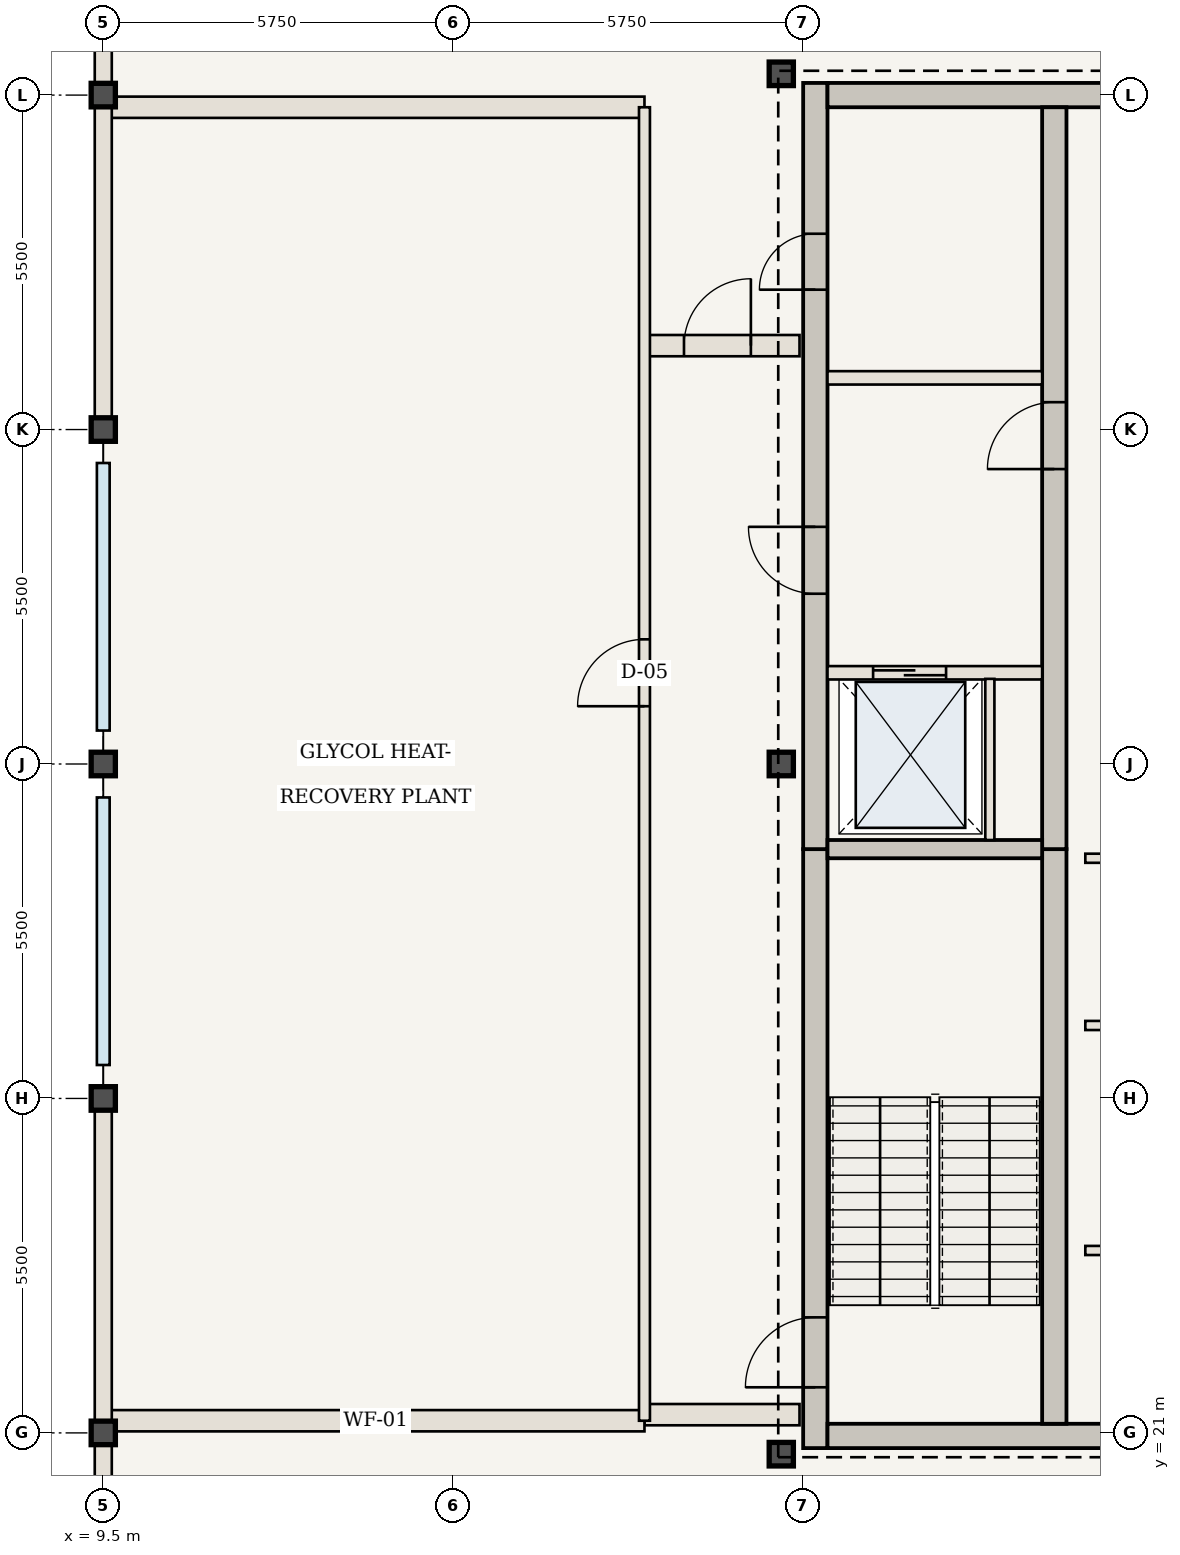
"""IFC4 building model, lengths in metres.
Left out: names, types, materials, properties, quantities, classifications, styles, units other than length and angle.
Written with IfcOpenShell. Run it as: python <this file> out.ifc"""

import sys

from ifc_helpers import new_model, si_unit, direction, frame, frame_2d, origin, origin_2d, place, context, subcontext, project, spatial, rectangle, i_section, extrude, element, fill, save


model = new_model("IFC4")
c1 = context("Model", 3, precision=1e-05, world=origin(), true_north=direction((0.0, 1.0)))
c2 = subcontext(c1, "Body", "Model", "MODEL_VIEW")
j1 = project(units=[si_unit("LENGTHUNIT", "METRE"), si_unit("PLANEANGLEUNIT", "RADIAN")], contexts=[c1])
p1 = place(None, origin())
s1 = spatial("IfcSite", under=j1, at=p1, CompositionType="ELEMENT")
p2 = place(p1, origin())
s2 = spatial("IfcBuilding", under=s1, at=p2, CompositionType="ELEMENT")
p3 = place(p2, frame((0.0, 0.0, 326.9)))
s3 = spatial("IfcBuildingStorey", under=s2, at=p3, CompositionType="ELEMENT", Elevation=326.9)
p4 = place(p3, frame((21.21, 20.75, 0.0), z_axis=(0.0, 0.0, 1.0), x_axis=(0.0, 1.0, 0.0)))
e1 = element("IfcWall", 1, at=p4, inside=s3, PredefinedType="SHEAR", context=c2, shape_type="SweptSolid", body=[
    extrude(rectangle(XDim=9.85, YDim=0.4, at=frame_2d((4.925, 0.0))), origin(), (0.0, 0.0, 1.0), 4.55),
])
p5 = place(p4, frame((1.0, 0.0, 0.0)))
e2 = element("IfcOpeningElement", 2, at=p5, cuts=e1, PredefinedType="OPENING", context=c2, shape_type="SweptSolid", body=[
    extrude(rectangle(XDim=1.15, YDim=2.15, at=frame_2d((0.575, 1.075))), frame((0.0, 0.21, 0.0), z_axis=(0.0, -1.0, 0.0), x_axis=(1.0, 0.0, 0.0)), (0.0, 0.0, 1.0), 0.42),
])
p6 = place(p3, frame((21.21, 30.6, 0.0), z_axis=(0.0, 0.0, 1.0), x_axis=(0.0, 1.0, 0.0)))
e3 = element("IfcWall", 3, at=p6, inside=s3, PredefinedType="SHEAR", context=c2, shape_type="SweptSolid", body=[
    extrude(rectangle(XDim=12.6, YDim=0.4, at=frame_2d((6.3, 0.0))), origin(), (0.0, 0.0, 1.0), 4.55),
])
p7 = place(p6, frame((4.2, 0.0, 0.0)))
e4 = element("IfcOpeningElement", 4, at=p7, cuts=e3, PredefinedType="OPENING", context=c2, shape_type="SweptSolid", body=[
    extrude(rectangle(XDim=1.1, YDim=2.15, at=frame_2d((0.55, 1.075))), frame((0.0, 0.21, 0.0), z_axis=(0.0, -1.0, 0.0), x_axis=(1.0, 0.0, 0.0)), (0.0, 0.0, 1.0), 0.42),
])
p8 = place(p6, frame((9.2, 0.0, 0.0)))
e5 = element("IfcOpeningElement", 5, at=p8, cuts=e3, PredefinedType="OPENING", context=c2, shape_type="SweptSolid", body=[
    extrude(rectangle(XDim=0.92, YDim=2.1, at=frame_2d((0.46, 1.05))), frame((0.0, 0.21, 0.0), z_axis=(0.0, -1.0, 0.0), x_axis=(1.0, 0.0, 0.0)), (0.0, 0.0, 1.0), 0.42),
])
p9 = place(p3, frame((21.41, 20.95, 0.0), z_axis=(0.0, 0.0, 1.0), x_axis=(1.0, 0.0, 0.0)))
e6 = element("IfcWall", 6, at=p9, inside=s3, PredefinedType="SHEAR", context=c2, shape_type="SweptSolid", body=[
    extrude(rectangle(XDim=13.74, YDim=0.4, at=frame_2d((6.87, 0.0))), origin(), (0.0, 0.0, 1.0), 4.55),
])
p10 = place(p3, frame((21.41, 43.0, 0.0), z_axis=(0.0, 0.0, 1.0), x_axis=(1.0, 0.0, 0.0)))
e7 = element("IfcWall", 7, at=p10, inside=s3, PredefinedType="SHEAR", context=c2, shape_type="SweptSolid", body=[
    extrude(rectangle(XDim=12.79, YDim=0.4, at=frame_2d((6.395, 0.0))), origin(), (0.0, 0.0, 1.0), 4.55),
])
p11 = place(p3, frame((25.14, 21.15, 0.0), z_axis=(0.0, 0.0, 1.0), x_axis=(0.0, 1.0, 0.0)))
e8 = element("IfcWall", 8, at=p11, inside=s3, PredefinedType="SHEAR", context=c2, shape_type="SweptSolid", body=[
    extrude(rectangle(XDim=9.45, YDim=0.4, at=frame_2d((4.725, 0.0))), origin(), (0.0, 0.0, 1.0), 4.55),
])
p12 = place(p3, frame((25.14, 30.6, 0.0), z_axis=(0.0, 0.0, 1.0), x_axis=(0.0, 1.0, 0.0)))
e9 = element("IfcWall", 9, at=p12, inside=s3, PredefinedType="SHEAR", context=c2, shape_type="SweptSolid", body=[
    extrude(rectangle(XDim=12.2, YDim=0.4, at=frame_2d((6.1, 0.0))), origin(), (0.0, 0.0, 1.0), 4.55),
])
p13 = place(p12, frame((6.25, 0.0, 0.0)))
e10 = element("IfcOpeningElement", 10, at=p13, cuts=e9, PredefinedType="OPENING", context=c2, shape_type="SweptSolid", body=[
    extrude(rectangle(XDim=1.1, YDim=2.15, at=frame_2d((0.55, 1.075))), frame((0.0, 0.21, 0.0), z_axis=(0.0, -1.0, 0.0), x_axis=(1.0, 0.0, 0.0)), (0.0, 0.0, 1.0), 0.42),
])
for number, where, z_axis, x_axis in (
    (11, (20.65, 20.65, 0.0), (0.0, 0.0, 1.0), (1.0, 0.0, 0.0)),
    (12, (20.65, 43.35, 0.0), (0.0, 0.0, 1.0), (1.0, 0.0, 0.0)),
    (13, (20.65, 32.0, 0.0), (0.0, 0.0, 1.0), (1.0, 0.0, 0.0)),
    (14, (9.5, 21.0, 0.0), (0.0, 0.0, 1.0), (1.0, 0.0, 0.0)),
    (15, (9.5, 26.5, 0.0), (0.0, 0.0, 1.0), (1.0, 0.0, 0.0)),
    (16, (9.5, 32.0, 0.0), (0.0, 0.0, 1.0), (1.0, 0.0, 0.0)),
    (17, (9.5, 37.5, 0.0), (0.0, 0.0, 1.0), (1.0, 0.0, 0.0)),
    (18, (9.5, 43.0, 0.0), (0.0, 0.0, 1.0), (1.0, 0.0, 0.0)),
):
    element("IfcColumn", number, at=place(p3, frame(where, z_axis=z_axis, x_axis=x_axis)), inside=s3, PredefinedType="COLUMN", context=c2, shape_type="SweptSolid", body=[
        extrude(i_section(OverallWidth=0.398, OverallDepth=0.387, WebThickness=0.021, FlangeThickness=0.033, at=origin_2d()), origin(), (0.0, 0.0, 1.0), 4.55),
    ])
p14 = place(p3, frame((21.41, 30.6, 0.0), z_axis=(0.0, 0.0, 1.0), x_axis=(1.0, 0.0, 0.0)))
e19 = element("IfcWall", 19, at=p14, inside=s3, PredefinedType="SHEAR", context=c2, shape_type="SweptSolid", body=[
    extrude(rectangle(XDim=3.53, YDim=0.3, at=frame_2d((1.765, 0.0))), origin(), (0.0, 0.0, 1.0), 4.29),
])
p15 = place(p3, frame((21.41, 33.5, 0.0), z_axis=(0.0, 0.0, 1.0), x_axis=(1.0, 0.0, 0.0)))
e20 = element("IfcWall", 20, at=p15, inside=s3, PredefinedType="STANDARD", context=c2, shape_type="SweptSolid", body=[
    extrude(rectangle(XDim=3.53, YDim=0.22, at=frame_2d((1.765, 0.0))), origin(), (0.0, 0.0, 1.0), 4.29),
])
p16 = place(p15, frame((0.75, 0.0, 0.0)))
e21 = element("IfcOpeningElement", 21, at=p16, cuts=e20, PredefinedType="OPENING", context=c2, shape_type="SweptSolid", body=[
    extrude(rectangle(XDim=1.2, YDim=2.2, at=frame_2d((0.6, 1.1))), frame((0.0, 0.12, 0.0), z_axis=(0.0, -1.0, 0.0), x_axis=(1.0, 0.0, 0.0)), (0.0, 0.0, 1.0), 0.24),
])
p17 = place(p3, frame((24.08, 30.75, 0.0), z_axis=(0.0, 0.0, 1.0), x_axis=(0.0, 1.0, 0.0)))
e22 = element("IfcWall", 22, at=p17, inside=s3, PredefinedType="STANDARD", context=c2, shape_type="SweptSolid", body=[
    extrude(rectangle(XDim=2.65, YDim=0.15, at=frame_2d((1.325, 0.0))), origin(), (0.0, 0.0, 1.0), 4.29),
])
p18 = place(p3, frame((21.41, 38.35, 0.0), z_axis=(0.0, 0.0, 1.0), x_axis=(1.0, 0.0, 0.0)))
e23 = element("IfcWall", 23, at=p18, inside=s3, PredefinedType="STANDARD", context=c2, shape_type="SweptSolid", body=[
    extrude(rectangle(XDim=3.53, YDim=0.22, at=frame_2d((1.765, 0.0))), origin(), (0.0, 0.0, 1.0), 4.29),
])
p19 = place(p3, frame((25.65, 24.0, 0.0), z_axis=(0.0, 0.0, 1.0), x_axis=(1.0, 0.0, 0.0)))
e24 = element("IfcWall", 24, at=p19, inside=s3, PredefinedType="STANDARD", context=c2, shape_type="SweptSolid", body=[
    extrude(rectangle(XDim=9.35, YDim=0.15, at=frame_2d((4.675, 0.0))), origin(), (0.0, 0.0, 1.0), 4.29),
])
p20 = place(p19, frame((1.35, 0.0, 0.0)))
e25 = element("IfcOpeningElement", 25, at=p20, cuts=e24, PredefinedType="OPENING", context=c2, shape_type="SweptSolid", body=[
    extrude(rectangle(XDim=0.95, YDim=2.15, at=frame_2d((0.475, 1.075))), frame((0.0, 0.085, 0.0), z_axis=(0.0, -1.0, 0.0), x_axis=(1.0, 0.0, 0.0)), (0.0, 0.0, 1.0), 0.17),
])
p21 = place(p19, frame((5.8, 0.0, 0.0)))
e26 = element("IfcOpeningElement", 26, at=p21, cuts=e24, PredefinedType="OPENING", context=c2, shape_type="SweptSolid", body=[
    extrude(rectangle(XDim=0.98, YDim=2.2, at=frame_2d((0.49, 1.1))), frame((0.0, 0.085, 0.0), z_axis=(0.0, -1.0, 0.0), x_axis=(1.0, 0.0, 0.0)), (0.0, 0.0, 1.0), 0.17),
])
p22 = place(p3, frame((25.65, 27.7, 0.0), z_axis=(0.0, 0.0, 1.0), x_axis=(1.0, 0.0, 0.0)))
e27 = element("IfcWall", 27, at=p22, inside=s3, PredefinedType="STANDARD", context=c2, shape_type="SweptSolid", body=[
    extrude(rectangle(XDim=9.35, YDim=0.15, at=frame_2d((4.675, 0.0))), origin(), (0.0, 0.0, 1.0), 4.29),
])
p23 = place(p22, frame((1.35, 0.0, 0.0)))
e28 = element("IfcOpeningElement", 28, at=p23, cuts=e27, PredefinedType="OPENING", context=c2, shape_type="SweptSolid", body=[
    extrude(rectangle(XDim=0.95, YDim=2.15, at=frame_2d((0.475, 1.075))), frame((0.0, 0.085, 0.0), z_axis=(0.0, -1.0, 0.0), x_axis=(1.0, 0.0, 0.0)), (0.0, 0.0, 1.0), 0.17),
])
p24 = place(p22, frame((6.4, 0.0, 0.0)))
e29 = element("IfcOpeningElement", 29, at=p24, cuts=e27, PredefinedType="OPENING", context=c2, shape_type="SweptSolid", body=[
    extrude(rectangle(XDim=0.98, YDim=2.2, at=frame_2d((0.49, 1.1))), frame((0.0, 0.085, 0.0), z_axis=(0.0, -1.0, 0.0), x_axis=(1.0, 0.0, 0.0)), (0.0, 0.0, 1.0), 0.17),
])
p25 = place(p3, frame((25.65, 30.45, 0.0), z_axis=(0.0, 0.0, 1.0), x_axis=(1.0, 0.0, 0.0)))
e30 = element("IfcWall", 30, at=p25, inside=s3, PredefinedType="STANDARD", context=c2, shape_type="SweptSolid", body=[
    extrude(rectangle(XDim=9.35, YDim=0.15, at=frame_2d((4.675, 0.0))), origin(), (0.0, 0.0, 1.0), 4.29),
])
p26 = place(p3, frame((18.4, 21.3, 0.0), z_axis=(0.0, 0.0, 1.0), x_axis=(1.0, 0.0, 0.0)))
e31 = element("IfcWall", 31, at=p26, inside=s3, PredefinedType="STANDARD", context=c2, shape_type="SweptSolid", body=[
    extrude(rectangle(XDim=2.55, YDim=0.35, at=frame_2d((1.275, 0.0))), origin(), (0.0, 0.0, 1.0), 4.29),
])
p27 = place(p3, frame((18.4, 38.88, 0.0), z_axis=(0.0, 0.0, 1.0), x_axis=(1.0, 0.0, 0.0)))
e32 = element("IfcWall", 32, at=p27, inside=s3, PredefinedType="STANDARD", context=c2, shape_type="SweptSolid", body=[
    extrude(rectangle(XDim=2.55, YDim=0.35, at=frame_2d((1.275, 0.0))), origin(), (0.0, 0.0, 1.0), 4.29),
])
p28 = place(p27, frame((0.65, 0.0, 0.0)))
e33 = element("IfcOpeningElement", 33, at=p28, cuts=e32, PredefinedType="OPENING", context=c2, shape_type="SweptSolid", body=[
    extrude(rectangle(XDim=1.1, YDim=2.15, at=frame_2d((0.55, 1.075))), frame((0.0, 0.185, 0.0), z_axis=(0.0, -1.0, 0.0), x_axis=(1.0, 0.0, 0.0)), (0.0, 0.0, 1.0), 0.37),
])
for number, where, z_axis, x_axis in (
    (34, (9.56, 21.2, 0.0), (0.0, 0.0, 1.0), (1.0, 0.0, 0.0)),
    (35, (9.56, 42.8, 0.0), (0.0, 0.0, 1.0), (1.0, 0.0, 0.0)),
):
    element("IfcWall", number, at=place(p3, frame(where, z_axis=z_axis, x_axis=x_axis)), inside=s3, PredefinedType="STANDARD", context=c2, shape_type="SweptSolid", body=[
        extrude(rectangle(XDim=8.84, YDim=0.35, at=frame_2d((4.42, 0.0))), origin(), (0.0, 0.0, 1.0), 4.29),
    ])
p29 = place(p3, frame((18.4, 21.2, 0.0), z_axis=(0.0, 0.0, 1.0), x_axis=(0.0, 1.0, 0.0)))
e36 = element("IfcWall", 36, at=p29, inside=s3, PredefinedType="STANDARD", context=c2, shape_type="SweptSolid", body=[
    extrude(rectangle(XDim=21.6, YDim=0.18, at=frame_2d((10.8, 0.0))), origin(), (0.0, 0.0, 1.0), 4.29),
])
p30 = place(p29, frame((11.75, 0.0, 0.0)))
e37 = element("IfcOpeningElement", 37, at=p30, cuts=e36, PredefinedType="OPENING", context=c2, shape_type="SweptSolid", body=[
    extrude(rectangle(XDim=1.1, YDim=2.15, at=frame_2d((0.55, 1.075))), frame((0.0, 0.1, 0.0), z_axis=(0.0, -1.0, 0.0), x_axis=(1.0, 0.0, 0.0)), (0.0, 0.0, 1.0), 0.2),
])
for number, where, z_axis, x_axis in (
    (38, (9.5, 15.5, 0.0), (0.0, 0.0, 1.0), (0.0, 1.0, 0.0)),
    (39, (9.5, 21.0, 0.0), (0.0, 0.0, 1.0), (0.0, 1.0, 0.0)),
    (40, (9.5, 37.5, 0.0), (0.0, 0.0, 1.0), (0.0, 1.0, 0.0)),
    (41, (9.5, 43.0, 0.0), (0.0, 0.0, 1.0), (0.0, 1.0, 0.0)),
):
    element("IfcWall", number, at=place(p3, frame(where, z_axis=z_axis, x_axis=x_axis)), inside=s3, PredefinedType="USERDEFINED", context=c2, shape_type="SweptSolid", body=[
        extrude(rectangle(XDim=5.5, YDim=0.28, at=frame_2d((2.75, 0.0))), origin(), (0.0, 0.0, 1.0), 3.57),
    ])
p31 = place(p5, origin())
e42 = element("IfcDoor", 42, at=p31, inside=s3, OperationType="SINGLE_SWING_LEFT", PredefinedType="DOOR", context=c2, shape_type="SweptSolid", body=[
    extrude(rectangle(XDim=1.15, YDim=2.15, at=frame_2d((0.575, 1.075))), frame((0.0, 0.025, 0.0), z_axis=(0.0, -1.0, 0.0), x_axis=(1.0, 0.0, 0.0)), (0.0, 0.0, 1.0), 0.05),
])
fill(e2, e42)
p32 = place(p7, origin())
e43 = element("IfcDoor", 43, at=p32, inside=s3, OperationType="SINGLE_SWING_RIGHT", PredefinedType="DOOR", context=c2, shape_type="SweptSolid", body=[
    extrude(rectangle(XDim=1.1, YDim=2.15, at=frame_2d((0.55, 1.075))), frame((0.0, 0.025, 0.0), z_axis=(0.0, -1.0, 0.0), x_axis=(1.0, 0.0, 0.0)), (0.0, 0.0, 1.0), 0.05),
])
fill(e4, e43)
p33 = place(p13, origin())
e44 = element("IfcDoor", 44, at=p33, inside=s3, OperationType="SINGLE_SWING_LEFT", PredefinedType="DOOR", context=c2, shape_type="SweptSolid", body=[
    extrude(rectangle(XDim=1.1, YDim=2.15, at=frame_2d((0.55, 1.075))), frame((0.0, 0.025, 0.0), z_axis=(0.0, -1.0, 0.0), x_axis=(1.0, 0.0, 0.0)), (0.0, 0.0, 1.0), 0.05),
])
fill(e10, e44)
p34 = place(p8, origin())
e45 = element("IfcDoor", 45, at=p34, inside=s3, OperationType="SINGLE_SWING_LEFT", PredefinedType="DOOR", context=c2, shape_type="SweptSolid", body=[
    extrude(rectangle(XDim=0.92, YDim=2.1, at=frame_2d((0.46, 1.05))), frame((0.0, 0.025, 0.0), z_axis=(0.0, -1.0, 0.0), x_axis=(1.0, 0.0, 0.0)), (0.0, 0.0, 1.0), 0.05),
])
fill(e5, e45)
p35 = place(p16, origin())
e46 = element("IfcDoor", 46, at=p35, inside=s3, OperationType="DOUBLE_DOOR_SLIDING", PredefinedType="DOOR", context=c2, shape_type="SweptSolid", body=[
    extrude(rectangle(XDim=1.2, YDim=2.2, at=frame_2d((0.6, 1.1))), frame((0.0, 0.025, 0.0), z_axis=(0.0, -1.0, 0.0), x_axis=(1.0, 0.0, 0.0)), (0.0, 0.0, 1.0), 0.05),
])
fill(e21, e46)
p36 = place(p28, origin())
e47 = element("IfcDoor", 47, at=p36, inside=s3, OperationType="SINGLE_SWING_RIGHT", PredefinedType="DOOR", context=c2, shape_type="SweptSolid", body=[
    extrude(rectangle(XDim=1.1, YDim=2.15, at=frame_2d((0.55, 1.075))), frame((0.0, 0.025, 0.0), z_axis=(0.0, -1.0, 0.0), x_axis=(1.0, 0.0, 0.0)), (0.0, 0.0, 1.0), 0.05),
])
fill(e33, e47)
p37 = place(p30, origin())
e48 = element("IfcDoor", 48, at=p37, inside=s3, OperationType="SINGLE_SWING_LEFT", PredefinedType="DOOR", context=c2, shape_type="SweptSolid", body=[
    extrude(rectangle(XDim=1.1, YDim=2.15, at=frame_2d((0.55, 1.075))), frame((0.0, 0.025, 0.0), z_axis=(0.0, -1.0, 0.0), x_axis=(1.0, 0.0, 0.0)), (0.0, 0.0, 1.0), 0.05),
])
fill(e37, e48)
save(model, sys.argv[1])
